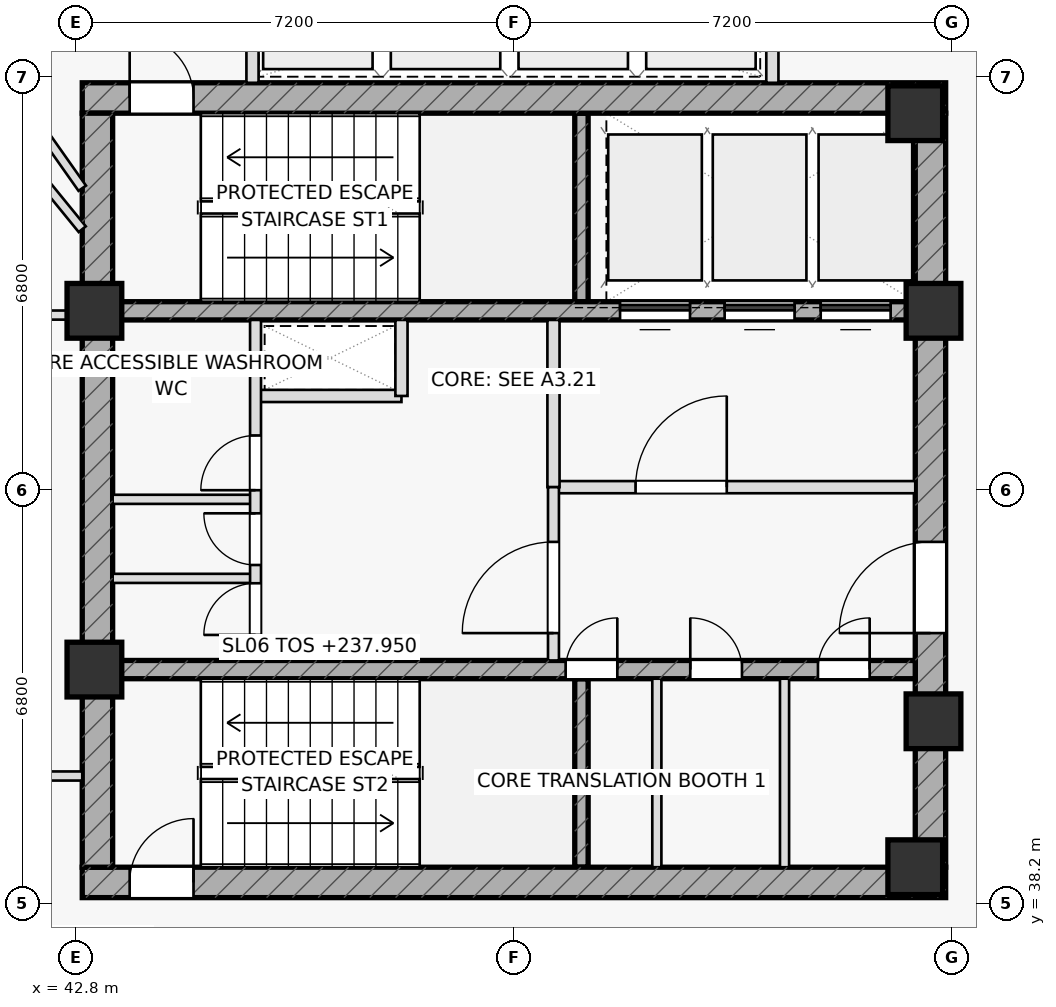
"""IFC4 building model, lengths in metres.
Left out: names, types, materials, properties, quantities, classifications, styles, units other than length and angle.
Written with IfcOpenShell. Run it as: python <this file> out.ifc"""

import sys

from ifc_helpers import new_model, si_unit, direction, frame, frame_2d, origin, origin_2d, place, context, subcontext, project, spatial, rectangle, extrude, element, fill, save


model = new_model("IFC4")
c1 = context("Model", 3, precision=1e-05, world=origin(), true_north=direction((0.0, 1.0)))
c2 = subcontext(c1, "Body", "Model", "MODEL_VIEW")
j1 = project(units=[si_unit("LENGTHUNIT", "METRE"), si_unit("PLANEANGLEUNIT", "RADIAN")], contexts=[c1])
p1 = place(None, origin())
s1 = spatial("IfcSite", under=j1, at=p1, CompositionType="ELEMENT")
p2 = place(p1, origin())
s2 = spatial("IfcBuilding", under=s1, at=p2, CompositionType="ELEMENT")
p3 = place(p2, frame((0.0, 0.0, 237.95)))
s3 = spatial("IfcBuildingStorey", under=s2, at=p3, CompositionType="ELEMENT", Elevation=237.95)
for number, where, z_axis, x_axis in (
    (1, (51.11, 48.1, 0.0), (0.0, 0.0, 1.0), (0.0, 1.0, 0.0)),
    (2, (51.11, 38.8, 0.0), (0.0, 0.0, 1.0), (0.0, 1.0, 0.0)),
):
    element("IfcWall", number, at=place(p3, frame(where, z_axis=z_axis, x_axis=x_axis)), inside=s3, PredefinedType="SHEAR", context=c2, shape_type="SweptSolid", body=[
        extrude(rectangle(XDim=3.1, YDim=0.22, at=frame_2d((1.55, 0.0))), origin(), (0.0, 0.0, 1.0), 3.65),
    ])
p4 = place(p3, frame((42.9, 51.45, 0.0), z_axis=(0.0, 0.0, 1.0), x_axis=(1.0, 0.0, 0.0)))
e3 = element("IfcWall", 3, at=p4, inside=s3, PredefinedType="SHEAR", context=c2, shape_type="SweptSolid", body=[
    extrude(rectangle(XDim=14.2, YDim=0.5, at=frame_2d((7.1, 0.0))), origin(), (0.0, 0.0, 1.0), 3.65),
])
p5 = place(p4, frame((0.78, 0.0, 0.0)))
e4 = element("IfcOpeningElement", 4, at=p5, cuts=e3, PredefinedType="OPENING", context=c2, shape_type="SweptSolid", body=[
    extrude(rectangle(XDim=1.05, YDim=2.2, at=frame_2d((0.525, 1.1))), frame((0.0, 0.26, 0.0), z_axis=(0.0, -1.0, 0.0), x_axis=(1.0, 0.0, 0.0)), (0.0, 0.0, 1.0), 0.52),
])
p6 = place(p3, frame((42.9, 38.55, 0.0), z_axis=(0.0, 0.0, 1.0), x_axis=(1.0, 0.0, 0.0)))
e5 = element("IfcWall", 5, at=p6, inside=s3, PredefinedType="SHEAR", context=c2, shape_type="SweptSolid", body=[
    extrude(rectangle(XDim=14.2, YDim=0.5, at=frame_2d((7.1, 0.0))), origin(), (0.0, 0.0, 1.0), 3.65),
])
p7 = place(p6, frame((0.78, 0.0, 0.0)))
e6 = element("IfcOpeningElement", 6, at=p7, cuts=e5, PredefinedType="OPENING", context=c2, shape_type="SweptSolid", body=[
    extrude(rectangle(XDim=1.05, YDim=2.2, at=frame_2d((0.525, 1.1))), frame((0.0, 0.26, 0.0), z_axis=(0.0, -1.0, 0.0), x_axis=(1.0, 0.0, 0.0)), (0.0, 0.0, 1.0), 0.52),
])
p8 = place(p3, frame((43.15, 38.8, 0.0), z_axis=(0.0, 0.0, 1.0), x_axis=(0.0, 1.0, 0.0)))
e7 = element("IfcWall", 7, at=p8, inside=s3, PredefinedType="SHEAR", context=c2, shape_type="SweptSolid", body=[
    extrude(rectangle(XDim=12.4, YDim=0.5, at=frame_2d((6.2, 0.0))), origin(), (0.0, 0.0, 1.0), 3.65),
])
p9 = place(p3, frame((56.85, 38.8, 0.0), z_axis=(0.0, 0.0, 1.0), x_axis=(0.0, 1.0, 0.0)))
e8 = element("IfcWall", 8, at=p9, inside=s3, PredefinedType="SHEAR", context=c2, shape_type="SweptSolid", body=[
    extrude(rectangle(XDim=12.4, YDim=0.5, at=frame_2d((6.2, 0.0))), origin(), (0.0, 0.0, 1.0), 3.65),
])
p10 = place(p9, frame((3.85, 0.0, 0.0)))
e9 = element("IfcOpeningElement", 9, at=p10, cuts=e8, PredefinedType="OPENING", context=c2, shape_type="SweptSolid", body=[
    extrude(rectangle(XDim=1.5, YDim=2.2, at=frame_2d((0.75, 1.1))), frame((0.0, 0.26, 0.0), z_axis=(0.0, -1.0, 0.0), x_axis=(1.0, 0.0, 0.0)), (0.0, 0.0, 1.0), 0.52),
])
p11 = place(p3, frame((43.4, 47.95, 0.0), z_axis=(0.0, 0.0, 1.0), x_axis=(1.0, 0.0, 0.0)))
e10 = element("IfcWall", 10, at=p11, inside=s3, PredefinedType="SHEAR", context=c2, shape_type="SweptSolid", body=[
    extrude(rectangle(XDim=13.2, YDim=0.3, at=frame_2d((6.6, 0.0))), origin(), (0.0, 0.0, 1.0), 3.65),
])
p12 = place(p11, frame((8.345, 0.0, 0.0)))
e11 = element("IfcOpeningElement", 11, at=p12, cuts=e10, PredefinedType="OPENING", context=c2, shape_type="SweptSolid", body=[
    extrude(rectangle(XDim=1.15, YDim=2.2, at=frame_2d((0.575, 1.1))), frame((0.0, 0.16, 0.0), z_axis=(0.0, -1.0, 0.0), x_axis=(1.0, 0.0, 0.0)), (0.0, 0.0, 1.0), 0.32),
])
p13 = place(p11, frame((10.065, 0.0, 0.0)))
e12 = element("IfcOpeningElement", 12, at=p13, cuts=e10, PredefinedType="OPENING", context=c2, shape_type="SweptSolid", body=[
    extrude(rectangle(XDim=1.15, YDim=2.2, at=frame_2d((0.575, 1.1))), frame((0.0, 0.16, 0.0), z_axis=(0.0, -1.0, 0.0), x_axis=(1.0, 0.0, 0.0)), (0.0, 0.0, 1.0), 0.32),
])
p14 = place(p11, frame((11.645, 0.0, 0.0)))
e13 = element("IfcOpeningElement", 13, at=p14, cuts=e10, PredefinedType="OPENING", context=c2, shape_type="SweptSolid", body=[
    extrude(rectangle(XDim=1.15, YDim=2.2, at=frame_2d((0.575, 1.1))), frame((0.0, 0.16, 0.0), z_axis=(0.0, -1.0, 0.0), x_axis=(1.0, 0.0, 0.0)), (0.0, 0.0, 1.0), 0.32),
])
p15 = place(p3, frame((43.4, 42.05, 0.0), z_axis=(0.0, 0.0, 1.0), x_axis=(1.0, 0.0, 0.0)))
e14 = element("IfcWall", 14, at=p15, inside=s3, PredefinedType="SHEAR", context=c2, shape_type="SweptSolid", body=[
    extrude(rectangle(XDim=13.2, YDim=0.3, at=frame_2d((6.6, 0.0))), origin(), (0.0, 0.0, 1.0), 3.65),
])
p16 = place(p15, frame((7.45, 0.0, 0.0)))
e15 = element("IfcOpeningElement", 15, at=p16, cuts=e14, PredefinedType="OPENING", context=c2, shape_type="SweptSolid", body=[
    extrude(rectangle(XDim=0.85, YDim=2.05, at=frame_2d((0.425, 1.025))), frame((0.0, 0.16, 0.0), z_axis=(0.0, -1.0, 0.0), x_axis=(1.0, 0.0, 0.0)), (0.0, 0.0, 1.0), 0.32),
])
p17 = place(p15, frame((9.5, 0.0, 0.0)))
e16 = element("IfcOpeningElement", 16, at=p17, cuts=e14, PredefinedType="OPENING", context=c2, shape_type="SweptSolid", body=[
    extrude(rectangle(XDim=0.85, YDim=2.05, at=frame_2d((0.425, 1.025))), frame((0.0, 0.16, 0.0), z_axis=(0.0, -1.0, 0.0), x_axis=(1.0, 0.0, 0.0)), (0.0, 0.0, 1.0), 0.32),
])
p18 = place(p15, frame((11.6, 0.0, 0.0)))
e17 = element("IfcOpeningElement", 17, at=p18, cuts=e14, PredefinedType="OPENING", context=c2, shape_type="SweptSolid", body=[
    extrude(rectangle(XDim=0.85, YDim=2.05, at=frame_2d((0.425, 1.025))), frame((0.0, 0.16, 0.0), z_axis=(0.0, -1.0, 0.0), x_axis=(1.0, 0.0, 0.0)), (0.0, 0.0, 1.0), 0.32),
])
for number, where, z_axis, x_axis in (
    (18, (43.1, 47.95, 0.0), (0.0, 0.0, 1.0), (1.0, 0.0, 0.0)),
    (19, (56.9, 47.95, 0.0), (0.0, 0.0, 1.0), (1.0, 0.0, 0.0)),
    (20, (56.6, 51.2, 0.0), (0.0, 0.0, 1.0), (1.0, 0.0, 0.0)),
    (21, (43.1, 42.05, 0.0), (0.0, 0.0, 1.0), (1.0, 0.0, 0.0)),
    (22, (56.9, 41.2, 0.0), (0.0, 0.0, 1.0), (1.0, 0.0, 0.0)),
    (23, (56.6, 38.8, 0.0), (0.0, 0.0, 1.0), (1.0, 0.0, 0.0)),
):
    element("IfcColumn", number, at=place(p3, frame(where, z_axis=z_axis, x_axis=x_axis)), inside=s3, PredefinedType="COLUMN", context=c2, shape_type="SweptSolid", body=[
        extrude(rectangle(XDim=0.9, YDim=0.9, at=origin_2d()), origin(), (0.0, 0.0, 1.0), 3.65),
    ])
for number, where, z_axis, x_axis in (
    (24, (45.7, 51.7, 0.0), (0.0, 0.0, 1.0), (0.0, 1.0, 0.0)),
    (25, (54.25, 51.7, 0.0), (0.0, 0.0, 1.0), (0.0, 1.0, 0.0)),
):
    element("IfcWall", number, at=place(p3, frame(where, z_axis=z_axis, x_axis=x_axis)), inside=s3, PredefinedType="PARTITIONING", context=c2, shape_type="SweptSolid", body=[
        extrude(rectangle(XDim=2.6, YDim=0.2, at=frame_2d((1.3, 0.0))), origin(), (0.0, 0.0, 1.0), 3.65),
    ])
p19 = place(p3, frame((45.75, 46.55, 0.0), z_axis=(0.0, 0.0, 1.0), x_axis=(1.0, 0.0, 0.0)))
e26 = element("IfcWall", 26, at=p19, inside=s3, PredefinedType="PARTITIONING", context=c2, shape_type="SweptSolid", body=[
    extrude(rectangle(XDim=2.4, YDim=0.2, at=frame_2d((1.2, 0.0))), origin(), (0.0, 0.0, 1.0), 3.65),
])
p20 = place(p3, frame((48.15, 46.55, 0.0), z_axis=(0.0, 0.0, 1.0), x_axis=(0.0, 1.0, 0.0)))
e27 = element("IfcWall", 27, at=p20, inside=s3, PredefinedType="PARTITIONING", context=c2, shape_type="SweptSolid", body=[
    extrude(rectangle(XDim=1.25, YDim=0.2, at=frame_2d((0.625, 0.0))), origin(), (0.0, 0.0, 1.0), 3.65),
])
p21 = place(p3, frame((50.65, 45.05, 0.0), z_axis=(0.0, 0.0, 1.0), x_axis=(1.0, 0.0, 0.0)))
e28 = element("IfcWall", 28, at=p21, inside=s3, PredefinedType="PARTITIONING", context=c2, shape_type="SweptSolid", body=[
    extrude(rectangle(XDim=5.95, YDim=0.2, at=frame_2d((2.975, 0.0))), origin(), (0.0, 0.0, 1.0), 3.65),
])
p22 = place(p21, frame((1.35, 0.0, 0.0)))
e29 = element("IfcOpeningElement", 29, at=p22, cuts=e28, PredefinedType="OPENING", context=c2, shape_type="SweptSolid", body=[
    extrude(rectangle(XDim=1.5, YDim=2.2, at=frame_2d((0.75, 1.1))), frame((0.0, 0.11, 0.0), z_axis=(0.0, -1.0, 0.0), x_axis=(1.0, 0.0, 0.0)), (0.0, 0.0, 1.0), 0.22),
])
p23 = place(p3, frame((50.65, 45.05, 0.0), z_axis=(0.0, 0.0, 1.0), x_axis=(0.0, 1.0, 0.0)))
e30 = element("IfcWall", 30, at=p23, inside=s3, PredefinedType="PARTITIONING", context=c2, shape_type="SweptSolid", body=[
    extrude(rectangle(XDim=2.75, YDim=0.2, at=frame_2d((1.375, 0.0))), origin(), (0.0, 0.0, 1.0), 3.65),
])
p24 = place(p3, frame((50.65, 42.2, 0.0), z_axis=(0.0, 0.0, 1.0), x_axis=(0.0, 1.0, 0.0)))
e31 = element("IfcWall", 31, at=p24, inside=s3, PredefinedType="PARTITIONING", context=c2, shape_type="SweptSolid", body=[
    extrude(rectangle(XDim=2.85, YDim=0.18, at=frame_2d((1.425, 0.0))), origin(), (0.0, 0.0, 1.0), 3.65),
])
p25 = place(p24, frame((0.45, 0.0, 0.0)))
e32 = element("IfcOpeningElement", 32, at=p25, cuts=e31, PredefinedType="OPENING", context=c2, shape_type="SweptSolid", body=[
    extrude(rectangle(XDim=1.5, YDim=2.2, at=frame_2d((0.75, 1.1))), frame((0.0, 0.1, 0.0), z_axis=(0.0, -1.0, 0.0), x_axis=(1.0, 0.0, 0.0)), (0.0, 0.0, 1.0), 0.2),
])
for number, where, z_axis, x_axis in (
    (33, (52.35, 38.8, 0.0), (0.0, 0.0, 1.0), (0.0, 1.0, 0.0)),
    (34, (54.45, 38.8, 0.0), (0.0, 0.0, 1.0), (0.0, 1.0, 0.0)),
):
    element("IfcWall", number, at=place(p3, frame(where, z_axis=z_axis, x_axis=x_axis)), inside=s3, PredefinedType="PARTITIONING", context=c2, shape_type="SweptSolid", body=[
        extrude(rectangle(XDim=3.1, YDim=0.15, at=frame_2d((1.55, 0.0))), origin(), (0.0, 0.0, 1.0), 3.65),
    ])
for number, where, z_axis, x_axis in (
    (35, (43.4, 43.55, 0.0), (0.0, 0.0, 1.0), (1.0, 0.0, 0.0)),
    (36, (43.4, 44.85, 0.0), (0.0, 0.0, 1.0), (1.0, 0.0, 0.0)),
):
    element("IfcWall", number, at=place(p3, frame(where, z_axis=z_axis, x_axis=x_axis)), inside=s3, PredefinedType="PARTITIONING", context=c2, shape_type="SweptSolid", body=[
        extrude(rectangle(XDim=2.35, YDim=0.15, at=frame_2d((1.175, 0.0))), origin(), (0.0, 0.0, 1.0), 3.65),
    ])
p26 = place(p3, frame((45.75, 42.2, 0.0), z_axis=(0.0, 0.0, 1.0), x_axis=(0.0, 1.0, 0.0)))
e37 = element("IfcWall", 37, at=p26, inside=s3, PredefinedType="PARTITIONING", context=c2, shape_type="SweptSolid", body=[
    extrude(rectangle(XDim=5.6, YDim=0.18, at=frame_2d((2.8, 0.0))), origin(), (0.0, 0.0, 1.0), 3.65),
])
p27 = place(p26, frame((0.42, 0.0, 0.0)))
e38 = element("IfcOpeningElement", 38, at=p27, cuts=e37, PredefinedType="OPENING", context=c2, shape_type="SweptSolid", body=[
    extrude(rectangle(XDim=0.85, YDim=2.05, at=frame_2d((0.425, 1.025))), frame((0.0, 0.1, 0.0), z_axis=(0.0, -1.0, 0.0), x_axis=(1.0, 0.0, 0.0)), (0.0, 0.0, 1.0), 0.2),
])
p28 = place(p26, frame((1.57, 0.0, 0.0)))
e39 = element("IfcOpeningElement", 39, at=p28, cuts=e37, PredefinedType="OPENING", context=c2, shape_type="SweptSolid", body=[
    extrude(rectangle(XDim=0.85, YDim=2.05, at=frame_2d((0.425, 1.025))), frame((0.0, 0.1, 0.0), z_axis=(0.0, -1.0, 0.0), x_axis=(1.0, 0.0, 0.0)), (0.0, 0.0, 1.0), 0.2),
])
p29 = place(p26, frame((2.8, 0.0, 0.0)))
e40 = element("IfcOpeningElement", 40, at=p29, cuts=e37, PredefinedType="OPENING", context=c2, shape_type="SweptSolid", body=[
    extrude(rectangle(XDim=0.9, YDim=2.05, at=frame_2d((0.45, 1.025))), frame((0.0, 0.1, 0.0), z_axis=(0.0, -1.0, 0.0), x_axis=(1.0, 0.0, 0.0)), (0.0, 0.0, 1.0), 0.2),
])
p30 = place(p3, frame((37.14, 40.3, 0.0), z_axis=(0.0, 0.0, 1.0), x_axis=(1.0, 0.0, 0.0)))
e41 = element("IfcWall", 41, at=p30, inside=s3, PredefinedType="PARTITIONING", context=c2, shape_type="SweptSolid", body=[
    extrude(rectangle(XDim=5.76, YDim=0.15, at=frame_2d((2.88, 0.0))), origin(), (0.0, 0.0, 1.0), 3.025),
])
p31 = place(p30, frame((3.21, 0.0, 0.0)))
e42 = element("IfcOpeningElement", 42, at=p31, cuts=e41, PredefinedType="OPENING", context=c2, shape_type="SweptSolid", body=[
    extrude(rectangle(XDim=0.95, YDim=2.05, at=frame_2d((0.475, 1.025))), frame((0.0, 0.085, 0.0), z_axis=(0.0, -1.0, 0.0), x_axis=(1.0, 0.0, 0.0)), (0.0, 0.0, 1.0), 0.17),
])
p32 = place(p3, frame((37.14, 47.88, 0.0), z_axis=(0.0, 0.0, 1.0), x_axis=(1.0, 0.0, 0.0)))
e43 = element("IfcWall", 43, at=p32, inside=s3, PredefinedType="PARTITIONING", context=c2, shape_type="SweptSolid", body=[
    extrude(rectangle(XDim=5.76, YDim=0.15, at=frame_2d((2.88, 0.0))), origin(), (0.0, 0.0, 1.0), 3.025),
])
p33 = place(p3, frame((42.9, 49.966, 0.0), z_axis=(0.0, 0.0, 1.0), x_axis=(-0.576086344137, 0.817388845103, 0.0)))
e44 = element("IfcWall", 44, at=p33, inside=s3, PredefinedType="PARTITIONING", context=c2, shape_type="SweptSolid", body=[
    extrude(rectangle(XDim=18.538, YDim=0.15, at=frame_2d((9.269, 0.0))), origin(), (0.0, 0.0, 1.0), 3.025),
])
p34 = place(p33, frame((8.342, 0.0, 0.0)))
e45 = element("IfcOpeningElement", 45, at=p34, cuts=e44, PredefinedType="OPENING", context=c2, shape_type="SweptSolid", body=[
    extrude(rectangle(XDim=0.95, YDim=2.05, at=frame_2d((0.475, 1.025))), frame((0.0, 0.085, 0.0), z_axis=(0.0, -1.0, 0.0), x_axis=(1.0, 0.0, 0.0)), (0.0, 0.0, 1.0), 0.17),
])
p35 = place(p3, frame((42.9, 49.292, 0.0), z_axis=(0.0, 0.0, 1.0), x_axis=(-0.631970108663, 0.77499276239, 0.0)))
e46 = element("IfcWall", 46, at=p35, inside=s3, PredefinedType="PARTITIONING", context=c2, shape_type="SweptSolid", body=[
    extrude(rectangle(XDim=20.223, YDim=0.15, at=frame_2d((10.111, 0.0))), origin(), (0.0, 0.0, 1.0), 3.025),
])
p36 = place(p35, frame((9.1, 0.0, 0.0)))
e47 = element("IfcOpeningElement", 47, at=p36, cuts=e46, PredefinedType="OPENING", context=c2, shape_type="SweptSolid", body=[
    extrude(rectangle(XDim=0.95, YDim=2.05, at=frame_2d((0.475, 1.025))), frame((0.0, 0.085, 0.0), z_axis=(0.0, -1.0, 0.0), x_axis=(1.0, 0.0, 0.0)), (0.0, 0.0, 1.0), 0.17),
])
p37 = place(p5, origin())
e48 = element("IfcDoor", 48, at=p37, inside=s3, OperationType="SINGLE_SWING_LEFT", PredefinedType="DOOR", context=c2, shape_type="SweptSolid", body=[
    extrude(rectangle(XDim=1.05, YDim=2.2, at=frame_2d((0.525, 1.1))), frame((0.0, 0.025, 0.0), z_axis=(0.0, -1.0, 0.0), x_axis=(1.0, 0.0, 0.0)), (0.0, 0.0, 1.0), 0.05),
])
fill(e4, e48)
p38 = place(p7, origin())
e49 = element("IfcDoor", 49, at=p38, inside=s3, OperationType="SINGLE_SWING_RIGHT", PredefinedType="DOOR", context=c2, shape_type="SweptSolid", body=[
    extrude(rectangle(XDim=1.05, YDim=2.2, at=frame_2d((0.525, 1.1))), frame((0.0, 0.025, 0.0), z_axis=(0.0, -1.0, 0.0), x_axis=(1.0, 0.0, 0.0)), (0.0, 0.0, 1.0), 0.05),
])
fill(e6, e49)
p39 = place(p10, origin())
e50 = element("IfcDoor", 50, at=p39, inside=s3, OperationType="SINGLE_SWING_LEFT", PredefinedType="DOOR", context=c2, shape_type="SweptSolid", body=[
    extrude(rectangle(XDim=1.5, YDim=2.2, at=frame_2d((0.75, 1.1))), frame((0.0, 0.025, 0.0), z_axis=(0.0, -1.0, 0.0), x_axis=(1.0, 0.0, 0.0)), (0.0, 0.0, 1.0), 0.05),
])
fill(e9, e50)
p40 = place(p22, origin())
e51 = element("IfcDoor", 51, at=p40, inside=s3, OperationType="SINGLE_SWING_RIGHT", PredefinedType="DOOR", context=c2, shape_type="SweptSolid", body=[
    extrude(rectangle(XDim=1.5, YDim=2.2, at=frame_2d((0.75, 1.1))), frame((0.0, 0.025, 0.0), z_axis=(0.0, -1.0, 0.0), x_axis=(1.0, 0.0, 0.0)), (0.0, 0.0, 1.0), 0.05),
])
fill(e29, e51)
p41 = place(p25, origin())
e52 = element("IfcDoor", 52, at=p41, inside=s3, OperationType="SINGLE_SWING_LEFT", PredefinedType="DOOR", context=c2, shape_type="SweptSolid", body=[
    extrude(rectangle(XDim=1.5, YDim=2.2, at=frame_2d((0.75, 1.1))), frame((0.0, 0.025, 0.0), z_axis=(0.0, -1.0, 0.0), x_axis=(1.0, 0.0, 0.0)), (0.0, 0.0, 1.0), 0.05),
])
fill(e32, e52)
p42 = place(p16, origin())
e53 = element("IfcDoor", 53, at=p42, inside=s3, OperationType="SINGLE_SWING_RIGHT", PredefinedType="DOOR", context=c2, shape_type="SweptSolid", body=[
    extrude(rectangle(XDim=0.85, YDim=2.05, at=frame_2d((0.425, 1.025))), frame((0.0, 0.025, 0.0), z_axis=(0.0, -1.0, 0.0), x_axis=(1.0, 0.0, 0.0)), (0.0, 0.0, 1.0), 0.05),
])
fill(e15, e53)
p43 = place(p17, origin())
e54 = element("IfcDoor", 54, at=p43, inside=s3, OperationType="SINGLE_SWING_LEFT", PredefinedType="DOOR", context=c2, shape_type="SweptSolid", body=[
    extrude(rectangle(XDim=0.85, YDim=2.05, at=frame_2d((0.425, 1.025))), frame((0.0, 0.025, 0.0), z_axis=(0.0, -1.0, 0.0), x_axis=(1.0, 0.0, 0.0)), (0.0, 0.0, 1.0), 0.05),
])
fill(e16, e54)
p44 = place(p18, origin())
e55 = element("IfcDoor", 55, at=p44, inside=s3, OperationType="SINGLE_SWING_RIGHT", PredefinedType="DOOR", context=c2, shape_type="SweptSolid", body=[
    extrude(rectangle(XDim=0.85, YDim=2.05, at=frame_2d((0.425, 1.025))), frame((0.0, 0.025, 0.0), z_axis=(0.0, -1.0, 0.0), x_axis=(1.0, 0.0, 0.0)), (0.0, 0.0, 1.0), 0.05),
])
fill(e17, e55)
p45 = place(p27, origin())
e56 = element("IfcDoor", 56, at=p45, inside=s3, OperationType="SINGLE_SWING_LEFT", PredefinedType="DOOR", context=c2, shape_type="SweptSolid", body=[
    extrude(rectangle(XDim=0.85, YDim=2.05, at=frame_2d((0.425, 1.025))), frame((0.0, 0.025, 0.0), z_axis=(0.0, -1.0, 0.0), x_axis=(1.0, 0.0, 0.0)), (0.0, 0.0, 1.0), 0.05),
])
fill(e38, e56)
p46 = place(p28, origin())
e57 = element("IfcDoor", 57, at=p46, inside=s3, OperationType="SINGLE_SWING_RIGHT", PredefinedType="DOOR", context=c2, shape_type="SweptSolid", body=[
    extrude(rectangle(XDim=0.85, YDim=2.05, at=frame_2d((0.425, 1.025))), frame((0.0, 0.025, 0.0), z_axis=(0.0, -1.0, 0.0), x_axis=(1.0, 0.0, 0.0)), (0.0, 0.0, 1.0), 0.05),
])
fill(e39, e57)
p47 = place(p29, origin())
e58 = element("IfcDoor", 58, at=p47, inside=s3, OperationType="SINGLE_SWING_LEFT", PredefinedType="DOOR", context=c2, shape_type="SweptSolid", body=[
    extrude(rectangle(XDim=0.9, YDim=2.05, at=frame_2d((0.45, 1.025))), frame((0.0, 0.025, 0.0), z_axis=(0.0, -1.0, 0.0), x_axis=(1.0, 0.0, 0.0)), (0.0, 0.0, 1.0), 0.05),
])
fill(e40, e58)
p48 = place(p12, origin())
e59 = element("IfcDoor", 59, at=p48, inside=s3, OperationType="SLIDING_TO_LEFT", PredefinedType="DOOR", context=c2, shape_type="SweptSolid", body=[
    extrude(rectangle(XDim=1.15, YDim=2.2, at=frame_2d((0.575, 1.1))), frame((0.0, 0.025, 0.0), z_axis=(0.0, -1.0, 0.0), x_axis=(1.0, 0.0, 0.0)), (0.0, 0.0, 1.0), 0.05),
])
fill(e11, e59)
p49 = place(p13, origin())
e60 = element("IfcDoor", 60, at=p49, inside=s3, OperationType="SLIDING_TO_LEFT", PredefinedType="DOOR", context=c2, shape_type="SweptSolid", body=[
    extrude(rectangle(XDim=1.15, YDim=2.2, at=frame_2d((0.575, 1.1))), frame((0.0, 0.025, 0.0), z_axis=(0.0, -1.0, 0.0), x_axis=(1.0, 0.0, 0.0)), (0.0, 0.0, 1.0), 0.05),
])
fill(e12, e60)
p50 = place(p14, origin())
e61 = element("IfcDoor", 61, at=p50, inside=s3, OperationType="SLIDING_TO_LEFT", PredefinedType="DOOR", context=c2, shape_type="SweptSolid", body=[
    extrude(rectangle(XDim=1.15, YDim=2.2, at=frame_2d((0.575, 1.1))), frame((0.0, 0.025, 0.0), z_axis=(0.0, -1.0, 0.0), x_axis=(1.0, 0.0, 0.0)), (0.0, 0.0, 1.0), 0.05),
])
fill(e13, e61)
save(model, sys.argv[1])
